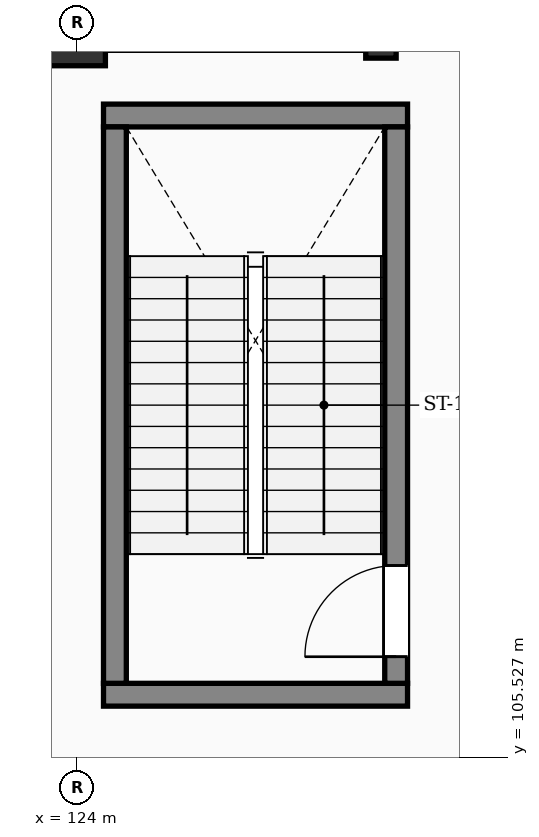
"""IFC4 building model, lengths in metres.
Left out: names, types, materials, properties, quantities, classifications, styles, units other than length and angle.
Written with IfcOpenShell. Run it as: python <this file> out.ifc"""

import sys

from ifc_helpers import new_model, si_unit, direction, frame, frame_2d, origin, origin_2d, place, context, subcontext, project, spatial, rectangle, extrude, element, fill, save


model = new_model("IFC4")
c1 = context("Model", 3, precision=1e-05, world=origin(), true_north=direction((0.0, 1.0)))
c2 = subcontext(c1, "Body", "Model", "MODEL_VIEW")
j1 = project(units=[si_unit("LENGTHUNIT", "METRE"), si_unit("PLANEANGLEUNIT", "RADIAN")], contexts=[c1])
p1 = place(None, origin())
s1 = spatial("IfcSite", under=j1, at=p1, CompositionType="ELEMENT")
p2 = place(p1, origin())
s2 = spatial("IfcBuilding", under=s1, at=p2, CompositionType="ELEMENT")
p3 = place(p2, frame((0.0, 0.0, 9.3)))
s3 = spatial("IfcBuildingStorey", under=s2, at=p3, CompositionType="ELEMENT", Elevation=9.3)
p4 = place(p3, frame((124.0, 115.0, 0.0), z_axis=(0.0, 0.0, 1.0), x_axis=(1.0, 0.0, 0.0)))
e1 = element("IfcColumn", 1, at=p4, inside=s3, PredefinedType="COLUMN", context=c2, shape_type="SweptSolid", body=[
    extrude(rectangle(XDim=0.75, YDim=0.75, at=origin_2d()), origin(), (0.0, 0.0, 1.0), 4.5),
])
p5 = place(p3, frame((128.0, 115.0, 0.0), z_axis=(0.0, 0.0, 1.0), x_axis=(1.0, 0.0, 0.0)))
e2 = element("IfcColumn", 2, at=p5, inside=s3, PredefinedType="PILASTER", context=c2, shape_type="SweptSolid", body=[
    extrude(rectangle(XDim=0.4, YDim=0.55, at=origin_2d()), origin(), (0.0, 0.0, 1.0), 4.5),
])
for number, where, z_axis, x_axis in (
    (3, (124.35, 106.35, 0.0), (0.0, 0.0, 1.0), (1.0, 0.0, 0.0)),
    (4, (128.35, 113.97, 0.0), (0.0, 0.0, 1.0), (-1.0, 0.0, 0.0)),
):
    element("IfcWall", number, at=place(p3, frame(where, z_axis=z_axis, x_axis=x_axis)), inside=s3, PredefinedType="SHEAR", context=c2, shape_type="SweptSolid", body=[
        extrude(rectangle(XDim=4.0, YDim=0.3, at=frame_2d((2.0, 0.0))), origin(), (0.0, 0.0, 1.0), 4.27),
    ])
p6 = place(p3, frame((124.5, 106.5, 0.0), z_axis=(0.0, 0.0, 1.0), x_axis=(0.0, 1.0, 0.0)))
e5 = element("IfcWall", 5, at=p6, inside=s3, PredefinedType="SHEAR", context=c2, shape_type="SweptSolid", body=[
    extrude(rectangle(XDim=7.32, YDim=0.3, at=frame_2d((3.66, 0.0))), origin(), (0.0, 0.0, 1.0), 4.27),
])
p7 = place(p3, frame((128.2, 106.5, 0.0), z_axis=(0.0, 0.0, 1.0), x_axis=(0.0, 1.0, 0.0)))
e6 = element("IfcWall", 6, at=p7, inside=s3, PredefinedType="SHEAR", context=c2, shape_type="SweptSolid", body=[
    extrude(rectangle(XDim=7.32, YDim=0.3, at=frame_2d((3.66, 0.0))), origin(), (0.0, 0.0, 1.0), 4.27),
])
p8 = place(p7, frame((0.35, 0.0, 0.0)))
e7 = element("IfcOpeningElement", 7, at=p8, cuts=e6, PredefinedType="OPENING", context=c2, shape_type="SweptSolid", body=[
    extrude(rectangle(XDim=1.2, YDim=2.15, at=frame_2d((0.6, 1.075))), frame((0.0, 0.16, 0.0), z_axis=(0.0, -1.0, 0.0), x_axis=(1.0, 0.0, 0.0)), (0.0, 0.0, 1.0), 0.32),
])
p9 = place(p8, origin())
e8 = element("IfcDoor", 8, at=p9, inside=s3, OperationType="SINGLE_SWING_LEFT", PredefinedType="DOOR", context=c2, shape_type="SweptSolid", body=[
    extrude(rectangle(XDim=1.2, YDim=2.15, at=frame_2d((0.6, 1.075))), frame((0.0, 0.025, 0.0), z_axis=(0.0, -1.0, 0.0), x_axis=(1.0, 0.0, 0.0)), (0.0, 0.0, 1.0), 0.05),
])
fill(e7, e8)
save(model, sys.argv[1])
